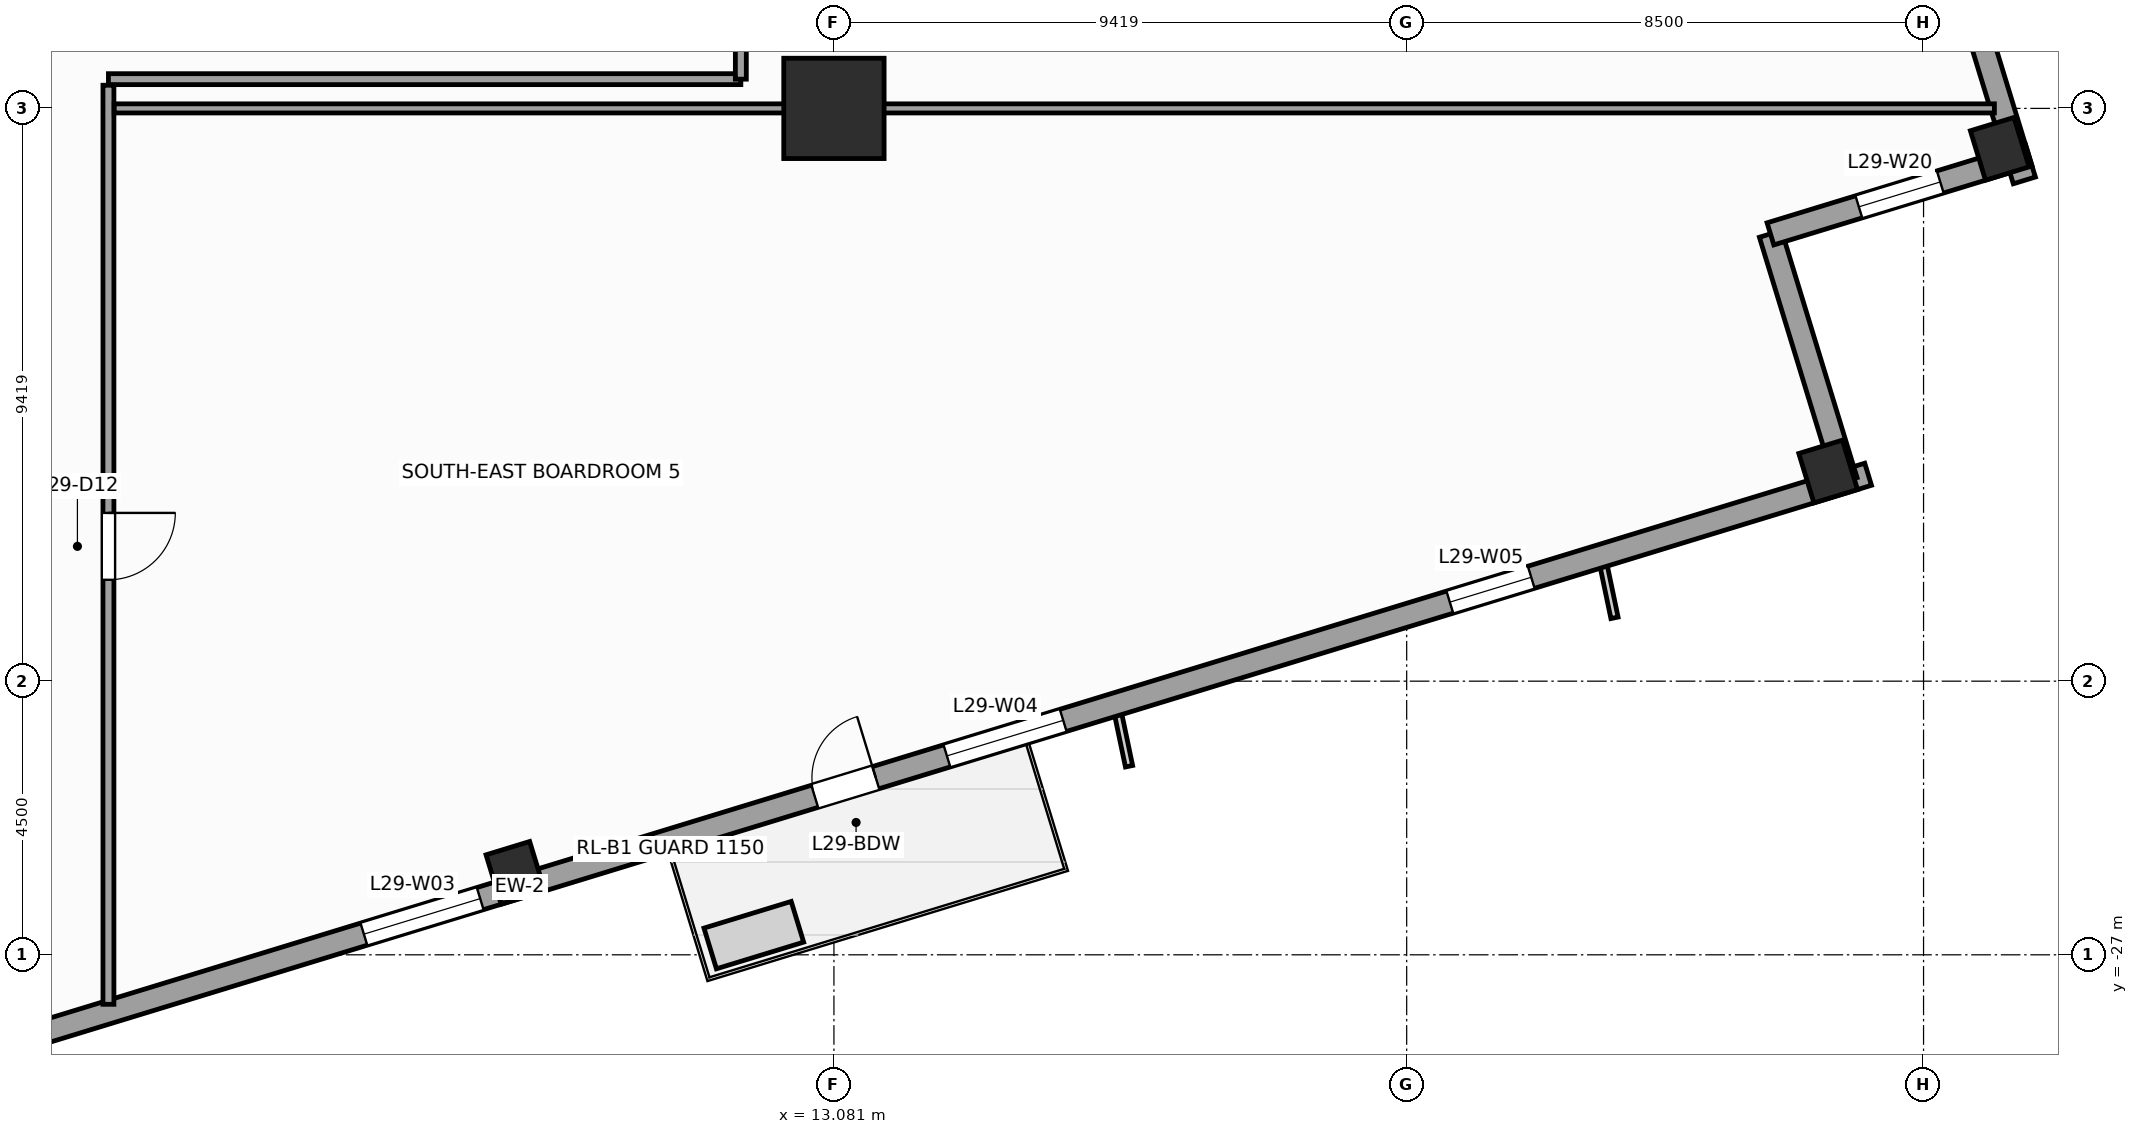
"""IFC4 building model, lengths in metres.
Left out: names, types, materials, properties, quantities, classifications, styles, units other than length and angle.
Written with IfcOpenShell. Run it as: python <this file> out.ifc"""

import sys

from ifc_helpers import new_model, si_unit, direction, frame, frame_2d, origin, origin_2d, place, context, subcontext, project, spatial, rectangle, extrude, source, transform, mapped, element, fill, save


model = new_model("IFC4")
c1 = context("Model", 3, precision=1e-05, world=origin(), true_north=direction((0.0, 1.0)))
c2 = subcontext(c1, "Body", "Model", "MODEL_VIEW")
j1 = project(units=[si_unit("LENGTHUNIT", "METRE"), si_unit("PLANEANGLEUNIT", "RADIAN")], contexts=[c1])
p1 = place(None, origin())
s1 = spatial("IfcSite", under=j1, at=p1, CompositionType="ELEMENT")
p2 = place(p1, origin())
s2 = spatial("IfcBuilding", under=s1, at=p2, CompositionType="ELEMENT")
p3 = place(p2, frame((0.0, 0.0, 123.2)))
s3 = spatial("IfcBuildingStorey", under=s2, at=p3, CompositionType="ELEMENT", Elevation=123.2)
m1 = source(origin(), c2, "Body", "SweptSolid", [
    extrude(rectangle(XDim=1.65, YDim=1.65, at=origin_2d()), origin(), (0.0, 0.0, 1.0), 4.0),
])
p4 = place(p3, frame((13.081, -13.081, 0.0), z_axis=(0.0, 0.0, 1.0), x_axis=(1.0, 0.0, 0.0)))
e1 = element("IfcColumn", 1, at=p4, inside=s3, PredefinedType="COLUMN", context=c2, shape_type="MappedRepresentation", body=[
    mapped(m1, transform((0.0, 0.0, 0.0), scale=1.0)),
])
m2 = source(origin(), c2, "Body", "SweptSolid", [
    extrude(rectangle(XDim=0.75, YDim=0.85, at=origin_2d()), origin(), (0.0, 0.0, 1.0), 4.0),
])
for number, where, z_axis, x_axis in (
    (2, (7.843, -25.653, 0.0), (0.0, 0.0, 1.0), (0.956, 0.292, 0.0)),
    (3, (29.431, -19.052, 0.0), (0.0, 0.0, 1.0), (0.956, 0.292, 0.0)),
    (4, (32.253, -13.746, 0.0), (0.0, 0.0, 1.0), (0.956, 0.292, 0.0)),
):
    element("IfcColumn", number, at=place(p3, frame(where, z_axis=z_axis, x_axis=x_axis)), inside=s3, PredefinedType="COLUMN", context=c2, shape_type="MappedRepresentation", body=[
        mapped(m2, transform((0.0, 0.0, 0.0), scale=1.0)),
    ])
p5 = place(p3, frame((-14.265, -32.658, 0.0), z_axis=(0.0, 0.0, 1.0), x_axis=(0.956304320851, 0.292373127906, 0.0)))
e5 = element("IfcWall", 5, at=p5, inside=s3, PredefinedType="STANDARD", context=c2, shape_type="SweptSolid", body=[
    extrude(rectangle(XDim=46.38, YDim=0.38, at=frame_2d((23.19, 0.0))), origin(), (0.0, 0.0, 1.0), 3.14),
])
p6 = place(p5, frame((28.265, 0.0, 0.0)))
e6 = element("IfcOpeningElement", 6, at=p6, cuts=e5, PredefinedType="OPENING", context=c2, shape_type="SweptSolid", body=[
    extrude(rectangle(XDim=1.05, YDim=2.25, at=frame_2d((0.525, 1.125))), frame((0.0, 0.2, 0.0), z_axis=(0.0, -1.0, 0.0), x_axis=(1.0, 0.0, 0.0)), (0.0, 0.0, 1.0), 0.4),
])
p7 = place(p5, frame((4.865, 0.0, 0.51)))
e7 = element("IfcOpeningElement", 7, at=p7, cuts=e5, PredefinedType="OPENING", context=c2, shape_type="SweptSolid", body=[
    extrude(rectangle(XDim=1.4, YDim=2.4, at=frame_2d((0.7, 1.2))), frame((0.0, 0.2, 0.0), z_axis=(0.0, -1.0, 0.0), x_axis=(1.0, 0.0, 0.0)), (0.0, 0.0, 1.0), 0.4),
])
p8 = place(p5, frame((10.95, 0.0, 0.51)))
e8 = element("IfcOpeningElement", 8, at=p8, cuts=e5, PredefinedType="OPENING", context=c2, shape_type="SweptSolid", body=[
    extrude(rectangle(XDim=2.0, YDim=2.4, at=frame_2d((1.0, 1.2))), frame((0.0, 0.2, 0.0), z_axis=(0.0, -1.0, 0.0), x_axis=(1.0, 0.0, 0.0)), (0.0, 0.0, 1.0), 0.4),
])
p9 = place(p5, frame((20.512, 0.0, 0.51)))
e9 = element("IfcOpeningElement", 9, at=p9, cuts=e5, PredefinedType="OPENING", context=c2, shape_type="SweptSolid", body=[
    extrude(rectangle(XDim=2.0, YDim=2.4, at=frame_2d((1.0, 1.2))), frame((0.0, 0.2, 0.0), z_axis=(0.0, -1.0, 0.0), x_axis=(1.0, 0.0, 0.0)), (0.0, 0.0, 1.0), 0.4),
])
p10 = place(p5, frame((30.538, 0.0, 0.51)))
e10 = element("IfcOpeningElement", 10, at=p10, cuts=e5, PredefinedType="OPENING", context=c2, shape_type="SweptSolid", body=[
    extrude(rectangle(XDim=2.0, YDim=2.4, at=frame_2d((1.0, 1.2))), frame((0.0, 0.2, 0.0), z_axis=(0.0, -1.0, 0.0), x_axis=(1.0, 0.0, 0.0)), (0.0, 0.0, 1.0), 0.4),
])
p11 = place(p5, frame((39.187, 0.0, 0.51)))
e11 = element("IfcOpeningElement", 11, at=p11, cuts=e5, PredefinedType="OPENING", context=c2, shape_type="SweptSolid", body=[
    extrude(rectangle(XDim=1.4, YDim=2.4, at=frame_2d((0.7, 1.2))), frame((0.0, 0.2, 0.0), z_axis=(0.0, -1.0, 0.0), x_axis=(1.0, 0.0, 0.0)), (0.0, 0.0, 1.0), 0.4),
])
p12 = place(p3, frame((29.725, -19.208, 0.0), z_axis=(0.0, 0.0, 1.0), x_axis=(-0.292345507338, 0.956312764915, 0.0)))
e12 = element("IfcWall", 12, at=p12, inside=s3, PredefinedType="STANDARD", context=c2, shape_type="SweptSolid", body=[
    extrude(rectangle(XDim=4.25, YDim=0.38, at=frame_2d((2.125, 0.0))), origin(), (0.0, 0.0, 1.0), 3.74),
])
p13 = place(p3, frame((28.482, -15.144, 0.0), z_axis=(0.0, 0.0, 1.0), x_axis=(0.956304176051, 0.292373601522, 0.0)))
e13 = element("IfcWall", 13, at=p13, inside=s3, PredefinedType="STANDARD", context=c2, shape_type="SweptSolid", body=[
    extrude(rectangle(XDim=4.44, YDim=0.38, at=frame_2d((2.22, 0.0))), origin(), (0.0, 0.0, 1.0), 3.04),
])
p14 = place(p13, frame((1.52, 0.0, 0.51)))
e14 = element("IfcOpeningElement", 14, at=p14, cuts=e13, PredefinedType="OPENING", context=c2, shape_type="SweptSolid", body=[
    extrude(rectangle(XDim=1.4, YDim=2.4, at=frame_2d((0.7, 1.2))), frame((0.0, 0.2, 0.0), z_axis=(0.0, -1.0, 0.0), x_axis=(1.0, 0.0, 0.0)), (0.0, 0.0, 1.0), 0.4),
])
p15 = place(p3, frame((32.658, -14.265, 0.0), z_axis=(0.0, 0.0, 1.0), x_axis=(-0.292373127906, 0.956304320851, 0.0)))
e15 = element("IfcWall", 15, at=p15, inside=s3, PredefinedType="STANDARD", context=c2, shape_type="SweptSolid", body=[
    extrude(rectangle(XDim=46.38, YDim=0.38, at=frame_2d((23.19, 0.0))), origin(), (0.0, 0.0, 1.0), 3.14),
])
p16 = place(p15, frame((4.865, 0.0, 0.51)))
e16 = element("IfcOpeningElement", 16, at=p16, cuts=e15, PredefinedType="OPENING", context=c2, shape_type="SweptSolid", body=[
    extrude(rectangle(XDim=1.4, YDim=2.4, at=frame_2d((0.7, 1.2))), frame((0.0, 0.2, 0.0), z_axis=(0.0, -1.0, 0.0), x_axis=(1.0, 0.0, 0.0)), (0.0, 0.0, 1.0), 0.4),
])
p17 = place(p15, frame((12.45, 0.0, 0.51)))
e17 = element("IfcOpeningElement", 17, at=p17, cuts=e15, PredefinedType="OPENING", context=c2, shape_type="SweptSolid", body=[
    extrude(rectangle(XDim=2.0, YDim=2.4, at=frame_2d((1.0, 1.2))), frame((0.0, 0.2, 0.0), z_axis=(0.0, -1.0, 0.0), x_axis=(1.0, 0.0, 0.0)), (0.0, 0.0, 1.0), 0.4),
])
p18 = place(p15, frame((30.538, 0.0, 0.51)))
e18 = element("IfcOpeningElement", 18, at=p18, cuts=e15, PredefinedType="OPENING", context=c2, shape_type="SweptSolid", body=[
    extrude(rectangle(XDim=2.0, YDim=2.4, at=frame_2d((1.0, 1.2))), frame((0.0, 0.2, 0.0), z_axis=(0.0, -1.0, 0.0), x_axis=(1.0, 0.0, 0.0)), (0.0, 0.0, 1.0), 0.4),
])
p19 = place(p15, frame((39.187, 0.0, 0.51)))
e19 = element("IfcOpeningElement", 19, at=p19, cuts=e15, PredefinedType="OPENING", context=c2, shape_type="SweptSolid", body=[
    extrude(rectangle(XDim=1.4, YDim=2.4, at=frame_2d((0.7, 1.2))), frame((0.0, 0.2, 0.0), z_axis=(0.0, -1.0, 0.0), x_axis=(1.0, 0.0, 0.0)), (0.0, 0.0, 1.0), 0.4),
])
p20 = place(p3, frame((1.15, -12.6, 0.0), z_axis=(0.0, 0.0, 1.0), x_axis=(1.0, 0.0, 0.0)))
e20 = element("IfcWall", 20, at=p20, inside=s3, PredefinedType="PARTITIONING", context=c2, shape_type="SweptSolid", body=[
    extrude(rectangle(XDim=10.4, YDim=0.18, at=frame_2d((5.2, 0.0))), origin(), (0.0, 0.0, 1.0), 3.74),
])
p21 = place(p3, frame((11.55, -12.6, 0.0), z_axis=(0.0, 0.0, 1.0), x_axis=(0.0, 1.0, 0.0)))
e21 = element("IfcWall", 21, at=p21, inside=s3, PredefinedType="PARTITIONING", context=c2, shape_type="SweptSolid", body=[
    extrude(rectangle(XDim=13.65, YDim=0.18, at=frame_2d((6.825, 0.0))), origin(), (0.0, 0.0, 1.0), 3.74),
])
p22 = place(p21, frame((2.714, 0.0, 0.0)))
e22 = element("IfcOpeningElement", 22, at=p22, cuts=e21, PredefinedType="OPENING", context=c2, shape_type="SweptSolid", body=[
    extrude(rectangle(XDim=1.1, YDim=2.2, at=frame_2d((0.55, 1.1))), frame((0.0, 0.1, 0.0), z_axis=(0.0, -1.0, 0.0), x_axis=(1.0, 0.0, 0.0)), (0.0, 0.0, 1.0), 0.2),
])
p23 = place(p3, frame((1.15, -27.814, 0.0), z_axis=(0.0, 0.0, 1.0), x_axis=(0.0, 1.0, 0.0)))
e23 = element("IfcWall", 23, at=p23, inside=s3, PredefinedType="PARTITIONING", context=c2, shape_type="SweptSolid", body=[
    extrude(rectangle(XDim=15.114, YDim=0.18, at=frame_2d((7.557, 0.0))), origin(), (0.0, 0.0, 1.0), 3.41),
])
p24 = place(p23, frame((6.981, 0.0, 0.0)))
e24 = element("IfcOpeningElement", 24, at=p24, cuts=e23, PredefinedType="OPENING", context=c2, shape_type="SweptSolid", body=[
    extrude(rectangle(XDim=1.1, YDim=2.2, at=frame_2d((0.55, 1.1))), frame((0.0, 0.1, 0.0), z_axis=(0.0, -1.0, 0.0), x_axis=(1.0, 0.0, 0.0)), (0.0, 0.0, 1.0), 0.2),
])
p25 = place(p3, frame((1.245, -13.081, 0.0), z_axis=(0.0, 0.0, 1.0), x_axis=(1.0, 0.0, 0.0)))
e25 = element("IfcWall", 25, at=p25, inside=s3, PredefinedType="PARTITIONING", context=c2, shape_type="SweptSolid", body=[
    extrude(rectangle(XDim=30.92, YDim=0.15, at=frame_2d((15.46, 0.0))), origin(), (0.0, 0.0, 1.0), 2.732),
])
m3 = source(origin(), c2, "Body", "SweptSolid", [
    extrude(rectangle(XDim=1.05, YDim=2.25, at=frame_2d((0.525, 1.125))), frame((0.0, 0.025, 0.0), z_axis=(0.0, -1.0, 0.0), x_axis=(1.0, 0.0, 0.0)), (0.0, 0.0, 1.0), 0.05),
])
p26 = place(p6, origin())
e26 = element("IfcDoor", 26, at=p26, inside=s3, OperationType="SINGLE_SWING_RIGHT", PredefinedType="DOOR", context=c2, shape_type="MappedRepresentation", body=[
    mapped(m3, transform((0.0, 0.0, 0.0), scale=1.0)),
])
fill(e6, e26)
m4 = source(origin(), c2, "Body", "SweptSolid", [
    extrude(rectangle(XDim=2.0, YDim=2.4, at=frame_2d((1.0, 1.2))), frame((0.0, 0.03, 0.0), z_axis=(0.0, -1.0, 0.0), x_axis=(1.0, 0.0, 0.0)), (0.0, 0.0, 1.0), 0.06),
])
p27 = place(p9, origin())
e27 = element("IfcWindow", 27, at=p27, inside=s3, PartitioningType="SINGLE_PANEL", PredefinedType="WINDOW", context=c2, shape_type="MappedRepresentation", body=[
    mapped(m4, transform((0.0, 0.0, 0.0), scale=1.0)),
])
fill(e9, e27)
p28 = place(p10, origin())
e28 = element("IfcWindow", 28, at=p28, inside=s3, PartitioningType="SINGLE_PANEL", PredefinedType="WINDOW", context=c2, shape_type="MappedRepresentation", body=[
    mapped(m4, transform((0.0, 0.0, 0.0), scale=1.0)),
])
fill(e10, e28)
m5 = source(origin(), c2, "Body", "SweptSolid", [
    extrude(rectangle(XDim=1.4, YDim=2.4, at=frame_2d((0.7, 1.2))), frame((0.0, 0.03, 0.0), z_axis=(0.0, -1.0, 0.0), x_axis=(1.0, 0.0, 0.0)), (0.0, 0.0, 1.0), 0.06),
])
p29 = place(p11, origin())
e29 = element("IfcWindow", 29, at=p29, inside=s3, PartitioningType="SINGLE_PANEL", PredefinedType="WINDOW", context=c2, shape_type="MappedRepresentation", body=[
    mapped(m5, transform((0.0, 0.0, 0.0), scale=1.0)),
])
fill(e11, e29)
p30 = place(p14, origin())
e30 = element("IfcWindow", 30, at=p30, inside=s3, PartitioningType="SINGLE_PANEL", PredefinedType="WINDOW", context=c2, shape_type="MappedRepresentation", body=[
    mapped(m5, transform((0.0, 0.0, 0.0), scale=1.0)),
])
fill(e14, e30)
m6 = source(origin(), c2, "Body", "SweptSolid", [
    extrude(rectangle(XDim=1.1, YDim=2.2, at=frame_2d((0.55, 1.1))), frame((0.0, 0.025, 0.0), z_axis=(0.0, -1.0, 0.0), x_axis=(1.0, 0.0, 0.0)), (0.0, 0.0, 1.0), 0.05),
])
p31 = place(p24, frame((1.1, 0.0, 0.0), z_axis=(0.0, 0.0, 1.0), x_axis=(-1.0, 0.0, 0.0)))
e31 = element("IfcDoor", 31, at=p31, inside=s3, OperationType="SINGLE_SWING_RIGHT", PredefinedType="DOOR", context=c2, shape_type="MappedRepresentation", body=[
    mapped(m6, transform((0.0, 0.0, 0.0), scale=1.0)),
])
fill(e24, e31)
save(model, sys.argv[1])
